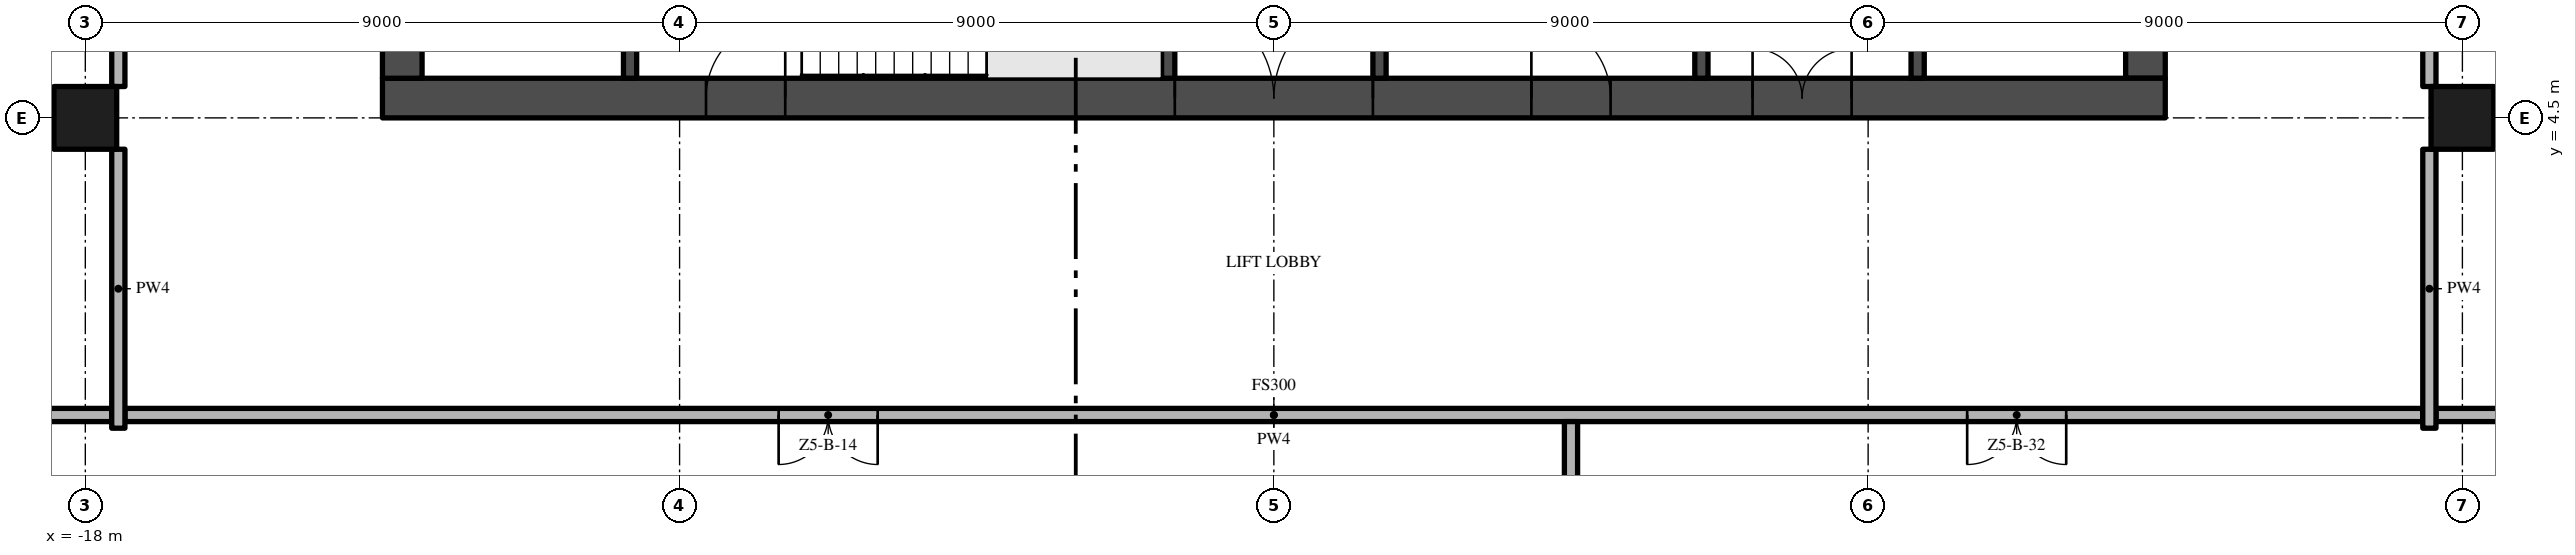
"""IFC4 building model, lengths in metres.
Left out: names, types, materials, properties, quantities, classifications, styles, units other than length and angle.
Written with IfcOpenShell. Run it as: python <this file> out.ifc"""

import sys

from ifc_helpers import new_model, si_unit, direction, frame, frame_2d, origin, origin_2d, place, context, subcontext, project, spatial, rectangle, extrude, element, fill, save


model = new_model("IFC4")
c1 = context("Model", 3, precision=1e-05, world=origin(), true_north=direction((0.0, 1.0)))
c2 = subcontext(c1, "Body", "Model", "MODEL_VIEW")
j1 = project(units=[si_unit("LENGTHUNIT", "METRE"), si_unit("PLANEANGLEUNIT", "RADIAN")], contexts=[c1])
p1 = place(None, origin())
s1 = spatial("IfcSite", under=j1, at=p1, CompositionType="ELEMENT")
p2 = place(p1, origin())
s2 = spatial("IfcBuilding", under=s1, at=p2, CompositionType="ELEMENT")
p3 = place(p2, frame((0.0, 0.0, 257.8)))
s3 = spatial("IfcBuildingStorey", under=s2, at=p3, CompositionType="ELEMENT", Elevation=257.8)
p4 = place(p3, frame((-13.5, 4.8, -0.3), z_axis=(0.0, 0.0, 1.0), x_axis=(1.0, 0.0, 0.0)))
e1 = element("IfcWall", 1, at=p4, inside=s3, PredefinedType="SHEAR", context=c2, shape_type="SweptSolid", body=[
    extrude(rectangle(XDim=27.0, YDim=0.6, at=frame_2d((13.5, 0.0))), origin(), (0.0, 0.0, 1.0), 3.8),
])
p5 = place(p4, frame((12.0, 0.0, 0.3)))
e2 = element("IfcOpeningElement", 2, at=p5, cuts=e1, PredefinedType="OPENING", context=c2, shape_type="SweptSolid", body=[
    extrude(rectangle(XDim=3.0, YDim=2.4, at=frame_2d((1.5, 1.2))), frame((0.0, 0.31, 0.0), z_axis=(0.0, -1.0, 0.0), x_axis=(1.0, 0.0, 0.0)), (0.0, 0.0, 1.0), 0.62),
])
p6 = place(p4, frame((4.9, 0.0, 0.3)))
e3 = element("IfcOpeningElement", 3, at=p6, cuts=e1, PredefinedType="OPENING", context=c2, shape_type="SweptSolid", body=[
    extrude(rectangle(XDim=1.2, YDim=2.2, at=frame_2d((0.6, 1.1))), frame((0.0, 0.31, 0.0), z_axis=(0.0, -1.0, 0.0), x_axis=(1.0, 0.0, 0.0)), (0.0, 0.0, 1.0), 0.62),
])
p7 = place(p4, frame((20.75, 0.0, 0.3)))
e4 = element("IfcOpeningElement", 4, at=p7, cuts=e1, PredefinedType="OPENING", context=c2, shape_type="SweptSolid", body=[
    extrude(rectangle(XDim=1.5, YDim=2.2, at=frame_2d((0.75, 1.1))), frame((0.0, 0.31, 0.0), z_axis=(0.0, -1.0, 0.0), x_axis=(1.0, 0.0, 0.0)), (0.0, 0.0, 1.0), 0.62),
])
p8 = place(p4, frame((17.4, 0.0, 0.3)))
e5 = element("IfcOpeningElement", 5, at=p8, cuts=e1, PredefinedType="OPENING", context=c2, shape_type="SweptSolid", body=[
    extrude(rectangle(XDim=1.2, YDim=2.2, at=frame_2d((0.6, 1.1))), frame((0.0, 0.31, 0.0), z_axis=(0.0, -1.0, 0.0), x_axis=(1.0, 0.0, 0.0)), (0.0, 0.0, 1.0), 0.62),
])
p9 = place(p3, frame((13.2, 5.1, -0.3), z_axis=(0.0, 0.0, 1.0), x_axis=(0.0, 1.0, 0.0)))
e6 = element("IfcWall", 6, at=p9, inside=s3, PredefinedType="SHEAR", context=c2, shape_type="SweptSolid", body=[
    extrude(rectangle(XDim=16.8, YDim=0.6, at=frame_2d((8.4, 0.0))), origin(), (0.0, 0.0, 1.0), 3.8),
])
p10 = place(p9, frame((6.3, 0.0, 0.3)))
e7 = element("IfcOpeningElement", 7, at=p10, cuts=e6, PredefinedType="OPENING", context=c2, shape_type="SweptSolid", body=[
    extrude(rectangle(XDim=1.2, YDim=2.2, at=frame_2d((0.6, 1.1))), frame((0.0, 0.31, 0.0), z_axis=(0.0, -1.0, 0.0), x_axis=(1.0, 0.0, 0.0)), (0.0, 0.0, 1.0), 0.62),
])
p11 = place(p3, frame((-13.2, 21.9, -0.3), z_axis=(0.0, 0.0, 1.0), x_axis=(0.0, -1.0, 0.0)))
e8 = element("IfcWall", 8, at=p11, inside=s3, PredefinedType="SHEAR", context=c2, shape_type="SweptSolid", body=[
    extrude(rectangle(XDim=16.8, YDim=0.6, at=frame_2d((8.4, 0.0))), origin(), (0.0, 0.0, 1.0), 3.8),
])
p12 = place(p11, frame((9.3, 0.0, 0.3)))
e9 = element("IfcOpeningElement", 9, at=p12, cuts=e8, PredefinedType="OPENING", context=c2, shape_type="SweptSolid", body=[
    extrude(rectangle(XDim=1.2, YDim=2.2, at=frame_2d((0.6, 1.1))), frame((0.0, 0.31, 0.0), z_axis=(0.0, -1.0, 0.0), x_axis=(1.0, 0.0, 0.0)), (0.0, 0.0, 1.0), 0.62),
])
for number, where, z_axis, x_axis in (
    (10, (-18.0, 4.5, 0.0), (0.0, 0.0, 1.0), (1.0, 0.0, 0.0)),
    (11, (18.0, 4.5, 0.0), (0.0, 0.0, 1.0), (1.0, 0.0, 0.0)),
):
    element("IfcColumn", number, at=place(p3, frame(where, z_axis=z_axis, x_axis=x_axis)), inside=s3, PredefinedType="COLUMN", context=c2, shape_type="SweptSolid", body=[
        extrude(rectangle(XDim=0.95, YDim=0.95, at=origin_2d()), origin(), (0.0, 0.0, 1.0), 3.5),
    ])
for number, where, z_axis, x_axis in (
    (12, (-9.75, 5.1, 0.0), (0.0, 0.0, 1.0), (0.0, 1.0, 0.0)),
    (13, (-1.6, 5.1, 0.0), (0.0, 0.0, 1.0), (0.0, 1.0, 0.0)),
):
    element("IfcWall", number, at=place(p3, frame(where, z_axis=z_axis, x_axis=x_axis)), inside=s3, PredefinedType="SHEAR", context=c2, shape_type="SweptSolid", body=[
        extrude(rectangle(XDim=2.85, YDim=0.2, at=frame_2d((1.425, 0.0))), origin(), (0.0, 0.0, 1.0), 3.5),
    ])
p13 = place(p3, frame((1.6, 11.5, 0.0), z_axis=(0.0, 0.0, 1.0), x_axis=(0.0, -1.0, 0.0)))
e14 = element("IfcWall", 14, at=p13, inside=s3, PredefinedType="SHEAR", context=c2, shape_type="SweptSolid", body=[
    extrude(rectangle(XDim=6.4, YDim=0.2, at=frame_2d((3.2, 0.0))), origin(), (0.0, 0.0, 1.0), 3.5),
])
p14 = place(p13, frame((2.35, 0.0, 0.0)))
e15 = element("IfcOpeningElement", 15, at=p14, cuts=e14, PredefinedType="OPENING", context=c2, shape_type="SweptSolid", body=[
    extrude(rectangle(XDim=0.9, YDim=2.1, at=frame_2d((0.45, 1.05))), frame((0.0, 0.11, 0.0), z_axis=(0.0, -1.0, 0.0), x_axis=(1.0, 0.0, 0.0)), (0.0, 0.0, 1.0), 0.22),
])
p15 = place(p3, frame((6.475, 5.1, 0.0), z_axis=(0.0, 0.0, 1.0), x_axis=(0.0, 1.0, 0.0)))
e16 = element("IfcWall", 16, at=p15, inside=s3, PredefinedType="SHEAR", context=c2, shape_type="SweptSolid", body=[
    extrude(rectangle(XDim=6.4, YDim=0.2, at=frame_2d((3.2, 0.0))), origin(), (0.0, 0.0, 1.0), 3.5),
])
p16 = place(p3, frame((9.75, 5.1, 0.0), z_axis=(0.0, 0.0, 1.0), x_axis=(0.0, 1.0, 0.0)))
e17 = element("IfcWall", 17, at=p16, inside=s3, PredefinedType="SHEAR", context=c2, shape_type="SweptSolid", body=[
    extrude(rectangle(XDim=2.5, YDim=0.2, at=frame_2d((1.25, 0.0))), origin(), (0.0, 0.0, 1.0), 3.5),
])
p17 = place(p16, frame((0.85, 0.0, 0.0)))
e18 = element("IfcOpeningElement", 18, at=p17, cuts=e17, PredefinedType="OPENING", context=c2, shape_type="SweptSolid", body=[
    extrude(rectangle(XDim=1.1, YDim=2.1, at=frame_2d((0.55, 1.05))), frame((0.0, 0.11, 0.0), z_axis=(0.0, -1.0, 0.0), x_axis=(1.0, 0.0, 0.0)), (0.0, 0.0, 1.0), 0.22),
])
p18 = place(p3, frame((17.4, 0.0, 0.0), z_axis=(0.0, 0.0, 1.0), x_axis=(-1.0, 0.0, 0.0)))
e19 = element("IfcWall", 19, at=p18, inside=s3, PredefinedType="PARTITIONING", context=c2, shape_type="SweptSolid", body=[
    extrude(rectangle(XDim=34.8, YDim=0.2, at=frame_2d((17.4, 0.0))), origin(), (0.0, 0.0, 1.0), 3.5),
])
p19 = place(p18, frame((23.4, 0.0, 0.0)))
e20 = element("IfcOpeningElement", 20, at=p19, cuts=e19, PredefinedType="OPENING", context=c2, shape_type="SweptSolid", body=[
    extrude(rectangle(XDim=1.5, YDim=2.4, at=frame_2d((0.75, 1.2))), frame((0.0, 0.11, 0.0), z_axis=(0.0, -1.0, 0.0), x_axis=(1.0, 0.0, 0.0)), (0.0, 0.0, 1.0), 0.22),
])
p20 = place(p18, frame((5.4, 0.0, 0.0)))
e21 = element("IfcOpeningElement", 21, at=p20, cuts=e19, PredefinedType="OPENING", context=c2, shape_type="SweptSolid", body=[
    extrude(rectangle(XDim=1.5, YDim=2.4, at=frame_2d((0.75, 1.2))), frame((0.0, 0.11, 0.0), z_axis=(0.0, -1.0, 0.0), x_axis=(1.0, 0.0, 0.0)), (0.0, 0.0, 1.0), 0.22),
])
for number, where, z_axis, x_axis in (
    (22, (-26.7, 0.0, 0.0), (0.0, 0.0, 1.0), (1.0, 0.0, 0.0)),
    (23, (17.6, 0.0, 0.0), (0.0, 0.0, 1.0), (1.0, 0.0, 0.0)),
):
    element("IfcWall", number, at=place(p3, frame(where, z_axis=z_axis, x_axis=x_axis)), inside=s3, PredefinedType="PARTITIONING", context=c2, shape_type="SweptSolid", body=[
        extrude(rectangle(XDim=9.1, YDim=0.2, at=frame_2d((4.55, 0.0))), origin(), (0.0, 0.0, 1.0), 3.5),
    ])
p21 = place(p3, frame((-17.5, -0.2, 0.0), z_axis=(0.0, 0.0, 1.0), x_axis=(0.0, 1.0, 0.0)))
e24 = element("IfcWall", 24, at=p21, inside=s3, PredefinedType="PARTITIONING", context=c2, shape_type="SweptSolid", body=[
    extrude(rectangle(XDim=4.225, YDim=0.2, at=frame_2d((2.112, 0.0))), origin(), (0.0, 0.0, 1.0), 3.5),
])
p22 = place(p3, frame((-17.5, 4.975, 0.0), z_axis=(0.0, 0.0, 1.0), x_axis=(0.0, 1.0, 0.0)))
e25 = element("IfcWall", 25, at=p22, inside=s3, PredefinedType="PARTITIONING", context=c2, shape_type="SweptSolid", body=[
    extrude(rectangle(XDim=8.05, YDim=0.2, at=frame_2d((4.025, 0.0))), origin(), (0.0, 0.0, 1.0), 3.5),
])
p23 = place(p22, frame((1.2, 0.0, 0.0)))
e26 = element("IfcOpeningElement", 26, at=p23, cuts=e25, PredefinedType="OPENING", context=c2, shape_type="SweptSolid", body=[
    extrude(rectangle(XDim=1.2, YDim=2.4, at=frame_2d((0.6, 1.2))), frame((0.0, 0.11, 0.0), z_axis=(0.0, -1.0, 0.0), x_axis=(1.0, 0.0, 0.0)), (0.0, 0.0, 1.0), 0.22),
])
p24 = place(p3, frame((4.5, -22.2, 0.0), z_axis=(0.0, 0.0, 1.0), x_axis=(0.0, 1.0, 0.0)))
e27 = element("IfcWall", 27, at=p24, inside=s3, PredefinedType="PARTITIONING", context=c2, shape_type="SweptSolid", body=[
    extrude(rectangle(XDim=22.1, YDim=0.2, at=frame_2d((11.05, 0.0))), origin(), (0.0, 0.0, 1.0), 3.5),
])
p25 = place(p3, frame((17.5, -0.2, 0.0), z_axis=(0.0, 0.0, 1.0), x_axis=(0.0, 1.0, 0.0)))
e28 = element("IfcWall", 28, at=p25, inside=s3, PredefinedType="PARTITIONING", context=c2, shape_type="SweptSolid", body=[
    extrude(rectangle(XDim=4.225, YDim=0.2, at=frame_2d((2.112, 0.0))), origin(), (0.0, 0.0, 1.0), 3.5),
])
p26 = place(p3, frame((17.5, 13.025, 0.0), z_axis=(0.0, 0.0, 1.0), x_axis=(0.0, -1.0, 0.0)))
e29 = element("IfcWall", 29, at=p26, inside=s3, PredefinedType="PARTITIONING", context=c2, shape_type="SweptSolid", body=[
    extrude(rectangle(XDim=8.05, YDim=0.2, at=frame_2d((4.025, 0.0))), origin(), (0.0, 0.0, 1.0), 3.5),
])
p27 = place(p26, frame((3.425, 0.0, 0.0)))
e30 = element("IfcOpeningElement", 30, at=p27, cuts=e29, PredefinedType="OPENING", context=c2, shape_type="SweptSolid", body=[
    extrude(rectangle(XDim=1.2, YDim=2.4, at=frame_2d((0.6, 1.2))), frame((0.0, 0.11, 0.0), z_axis=(0.0, -1.0, 0.0), x_axis=(1.0, 0.0, 0.0)), (0.0, 0.0, 1.0), 0.22),
])
p28 = place(p5, frame((3.0, 0.0, 0.0), z_axis=(0.0, 0.0, 1.0), x_axis=(-1.0, 0.0, 0.0)))
e31 = element("IfcDoor", 31, at=p28, inside=s3, OperationType="DOUBLE_DOOR_SINGLE_SWING", PredefinedType="DOOR", context=c2, shape_type="SweptSolid", body=[
    extrude(rectangle(XDim=3.0, YDim=2.4, at=frame_2d((1.5, 1.2))), frame((0.0, 0.025, 0.0), z_axis=(0.0, -1.0, 0.0), x_axis=(1.0, 0.0, 0.0)), (0.0, 0.0, 1.0), 0.05),
])
fill(e2, e31)
p29 = place(p6, frame((1.2, 0.0, 0.0), z_axis=(0.0, 0.0, 1.0), x_axis=(-1.0, 0.0, 0.0)))
e32 = element("IfcDoor", 32, at=p29, inside=s3, OperationType="SINGLE_SWING_LEFT", PredefinedType="DOOR", context=c2, shape_type="SweptSolid", body=[
    extrude(rectangle(XDim=1.2, YDim=2.2, at=frame_2d((0.6, 1.1))), frame((0.0, 0.025, 0.0), z_axis=(0.0, -1.0, 0.0), x_axis=(1.0, 0.0, 0.0)), (0.0, 0.0, 1.0), 0.05),
])
fill(e3, e32)
p30 = place(p7, frame((1.5, 0.0, 0.0), z_axis=(0.0, 0.0, 1.0), x_axis=(-1.0, 0.0, 0.0)))
e33 = element("IfcDoor", 33, at=p30, inside=s3, OperationType="DOUBLE_DOOR_SINGLE_SWING", PredefinedType="DOOR", context=c2, shape_type="SweptSolid", body=[
    extrude(rectangle(XDim=1.5, YDim=2.2, at=frame_2d((0.75, 1.1))), frame((0.0, 0.025, 0.0), z_axis=(0.0, -1.0, 0.0), x_axis=(1.0, 0.0, 0.0)), (0.0, 0.0, 1.0), 0.05),
])
fill(e4, e33)
p31 = place(p8, frame((1.2, 0.0, 0.0), z_axis=(0.0, 0.0, 1.0), x_axis=(-1.0, 0.0, 0.0)))
e34 = element("IfcDoor", 34, at=p31, inside=s3, OperationType="SINGLE_SWING_RIGHT", PredefinedType="DOOR", context=c2, shape_type="SweptSolid", body=[
    extrude(rectangle(XDim=1.2, YDim=2.2, at=frame_2d((0.6, 1.1))), frame((0.0, 0.025, 0.0), z_axis=(0.0, -1.0, 0.0), x_axis=(1.0, 0.0, 0.0)), (0.0, 0.0, 1.0), 0.05),
])
fill(e5, e34)
p32 = place(p19, origin())
e35 = element("IfcDoor", 35, at=p32, inside=s3, OperationType="DOUBLE_DOOR_SINGLE_SWING", PredefinedType="DOOR", context=c2, shape_type="SweptSolid", body=[
    extrude(rectangle(XDim=1.5, YDim=2.4, at=frame_2d((0.75, 1.2))), frame((0.0, 0.025, 0.0), z_axis=(0.0, -1.0, 0.0), x_axis=(1.0, 0.0, 0.0)), (0.0, 0.0, 1.0), 0.05),
])
fill(e20, e35)
p33 = place(p20, origin())
e36 = element("IfcDoor", 36, at=p33, inside=s3, OperationType="DOUBLE_DOOR_SINGLE_SWING", PredefinedType="DOOR", context=c2, shape_type="SweptSolid", body=[
    extrude(rectangle(XDim=1.5, YDim=2.4, at=frame_2d((0.75, 1.2))), frame((0.0, 0.025, 0.0), z_axis=(0.0, -1.0, 0.0), x_axis=(1.0, 0.0, 0.0)), (0.0, 0.0, 1.0), 0.05),
])
fill(e21, e36)
save(model, sys.argv[1])
